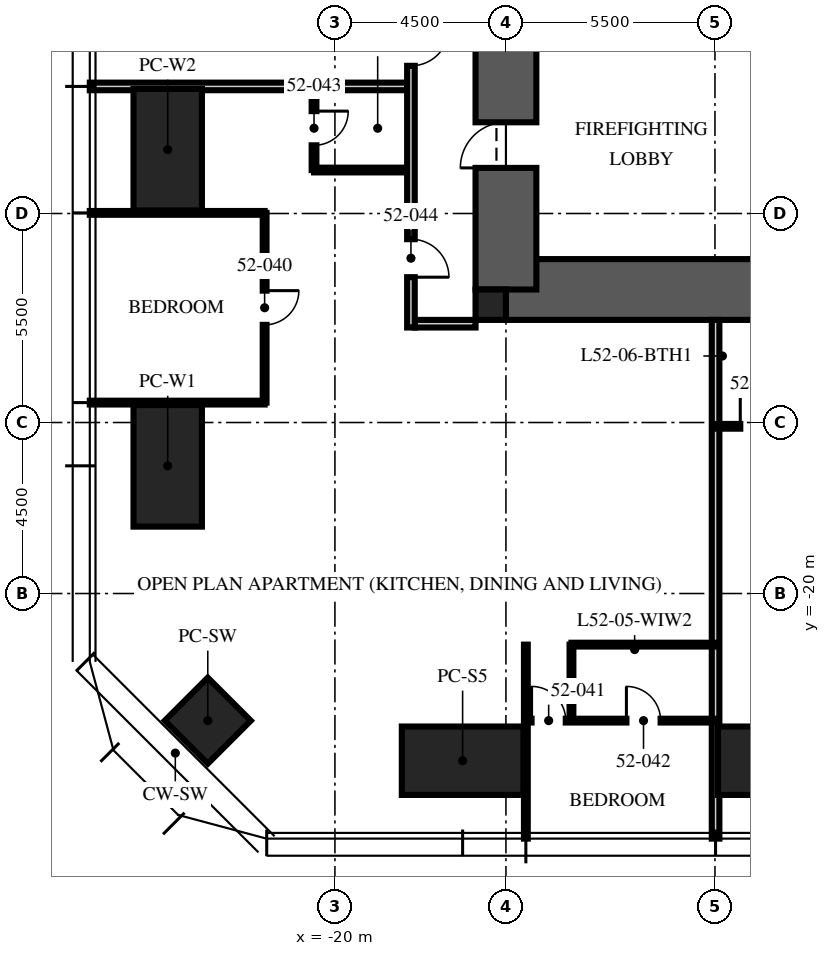
"""IFC4 building model, lengths in metres.
Left out: names, types, materials, properties, quantities, classifications, styles, units other than length and angle.
Written with IfcOpenShell. Run it as: python <this file> out.ifc"""

import sys

from ifc_helpers import new_model, si_unit, direction, frame, frame_2d, origin, origin_2d, place, context, subcontext, project, spatial, rectangle, hollow_rectangle, extrude, element, fill, save


model = new_model("IFC4")
c1 = context("Model", 3, precision=1e-05, world=origin(), true_north=direction((0.0, 1.0)))
c2 = subcontext(c1, "Body", "Model", "MODEL_VIEW")
j1 = project(units=[si_unit("LENGTHUNIT", "METRE"), si_unit("PLANEANGLEUNIT", "RADIAN")], contexts=[c1])
p1 = place(None, origin())
s1 = spatial("IfcSite", under=j1, at=p1, CompositionType="ELEMENT")
p2 = place(p1, origin())
s2 = spatial("IfcBuilding", under=s1, at=p2, CompositionType="ELEMENT")
p3 = place(p2, frame((0.0, 0.0, 210.75)))
s3 = spatial("IfcBuildingStorey", under=s2, at=p3, CompositionType="ELEMENT", Elevation=210.75)
p4 = place(p3, frame((-15.5, -12.0, -0.25), z_axis=(0.0, 0.0, 1.0), x_axis=(1.0, 0.0, 0.0)))
e1 = element("IfcWall", 1, at=p4, inside=s3, PredefinedType="SHEAR", context=c2, shape_type="SweptSolid", body=[
    extrude(rectangle(XDim=31.0, YDim=1.6, at=frame_2d((15.5, 0.0))), origin(), (0.0, 0.0, 1.0), 3.75),
])
p5 = place(p3, frame((-15.5, -12.0, -0.25), z_axis=(0.0, 0.0, 1.0), x_axis=(0.0, 1.0, 0.0)))
e2 = element("IfcWall", 2, at=p5, inside=s3, PredefinedType="SHEAR", context=c2, shape_type="SweptSolid", body=[
    extrude(rectangle(XDim=24.0, YDim=1.6, at=frame_2d((12.0, 0.0))), origin(), (0.0, 0.0, 1.0), 3.75),
])
p6 = place(p5, frame((3.2, 0.0, 0.25)))
e3 = element("IfcOpeningElement", 3, at=p6, cuts=e2, PredefinedType="OPENING", context=c2, shape_type="SweptSolid", body=[
    extrude(rectangle(XDim=1.2, YDim=2.1, at=frame_2d((0.6, 1.05))), frame((0.0, 0.81, 0.0), z_axis=(0.0, -1.0, 0.0), x_axis=(1.0, 0.0, 0.0)), (0.0, 0.0, 1.0), 1.62),
])
p7 = place(p5, frame((19.3, 0.0, 0.25)))
e4 = element("IfcOpeningElement", 4, at=p7, cuts=e2, PredefinedType="OPENING", context=c2, shape_type="SweptSolid", body=[
    extrude(rectangle(XDim=1.8, YDim=2.1, at=frame_2d((0.9, 1.05))), frame((0.0, 0.81, 0.0), z_axis=(0.0, -1.0, 0.0), x_axis=(1.0, 0.0, 0.0)), (0.0, 0.0, 1.0), 1.62),
])
p8 = place(p3, frame((-15.9, -12.4, -0.25), z_axis=(0.0, 0.0, 1.0), x_axis=(1.0, 0.0, 0.0)))
e5 = element("IfcColumn", 5, at=p8, inside=s3, PredefinedType="COLUMN", context=c2, shape_type="SweptSolid", body=[
    extrude(rectangle(XDim=0.8, YDim=0.8, at=origin_2d()), origin(), (0.0, 0.0, 1.0), 3.75),
])
for number, where, z_axis, x_axis in (
    (6, (-8.32, -24.4, 0.0), (0.0, 0.0, 1.0), (1.0, 0.0, 0.0)),
    (7, (-16.64, -24.4, 0.0), (0.0, 0.0, 1.0), (1.0, 0.0, 0.0)),
    (8, (-24.4, -16.64, 0.0), (0.0, 0.0, 1.0), (0.0, 1.0, 0.0)),
    (9, (-24.4, -8.32, 0.0), (0.0, 0.0, 1.0), (0.0, 1.0, 0.0)),
):
    element("IfcColumn", number, at=place(p3, frame(where, z_axis=z_axis, x_axis=x_axis)), inside=s3, PredefinedType="COLUMN", context=c2, shape_type="SweptSolid", body=[
        extrude(hollow_rectangle(XDim=3.2, YDim=1.8, WallThickness=0.2, at=origin_2d()), origin(), (0.0, 0.0, 1.0), 3.75),
    ])
p9 = place(p3, frame((-23.346, -23.346, 0.0), z_axis=(0.0, 0.0, 1.0), x_axis=(0.707106781187, -0.707106781187, 0.0)))
e10 = element("IfcColumn", 10, at=p9, inside=s3, PredefinedType="COLUMN", context=c2, shape_type="SweptSolid", body=[
    extrude(hollow_rectangle(XDim=1.6, YDim=1.6, WallThickness=0.1, at=origin_2d()), origin(), (0.0, 0.0, 1.0), 3.75),
])
p10 = place(p3, frame((-16.3, -12.9, 0.0), z_axis=(0.0, 0.0, 1.0), x_axis=(-1.0, 0.0, 0.0)))
e11 = element("IfcWall", 11, at=p10, inside=s3, PredefinedType="PARTITIONING", context=c2, shape_type="SweptSolid", body=[
    extrude(rectangle(XDim=1.6, YDim=0.2, at=frame_2d((0.8, 0.0))), origin(), (0.0, 0.0, 1.0), 2.3),
])
p11 = place(p3, frame((-18.1, -6.656, 0.0), z_axis=(0.0, 0.0, 1.0), x_axis=(-1.0, 0.0, 0.0)))
e12 = element("IfcWall", 12, at=p11, inside=s3, PredefinedType="PARTITIONING", context=c2, shape_type="SweptSolid", body=[
    extrude(rectangle(XDim=8.35, YDim=0.2, at=frame_2d((4.175, 0.0))), origin(), (0.0, 0.0, 1.0), 2.91),
])
for number, where, z_axis, x_axis in (
    (13, (-21.85, -9.984, 0.0), (0.0, 0.0, 1.0), (-1.0, 0.0, 0.0)),
    (14, (-21.85, -14.976, 0.0), (0.0, 0.0, 1.0), (-1.0, 0.0, 0.0)),
):
    element("IfcWall", number, at=place(p3, frame(where, z_axis=z_axis, x_axis=x_axis)), inside=s3, PredefinedType="PARTITIONING", context=c2, shape_type="SweptSolid", body=[
        extrude(rectangle(XDim=4.6, YDim=0.1, at=frame_2d((2.3, 0.0))), origin(), (0.0, 0.0, 1.0), 2.91),
    ])
p12 = place(p3, frame((-14.976, -21.345, 0.0), z_axis=(0.0, 0.0, 1.0), x_axis=(0.0, -1.0, 0.0)))
e15 = element("IfcWall", 15, at=p12, inside=s3, PredefinedType="PARTITIONING", context=c2, shape_type="SweptSolid", body=[
    extrude(rectangle(XDim=5.105, YDim=0.1, at=frame_2d((2.552, 0.0))), origin(), (0.0, 0.0, 1.0), 2.91),
])
p13 = place(p3, frame((-9.984, -12.8, 0.0), z_axis=(0.0, 0.0, 1.0), x_axis=(0.0, -1.0, 0.0)))
e16 = element("IfcWall", 16, at=p13, inside=s3, PredefinedType="PARTITIONING", context=c2, shape_type="SweptSolid", body=[
    extrude(rectangle(XDim=13.65, YDim=0.2, at=frame_2d((6.825, 0.0))), origin(), (0.0, 0.0, 1.0), 2.91),
])
p14 = place(p3, frame((-21.85, -9.984, 0.0), z_axis=(0.0, 0.0, 1.0), x_axis=(0.0, -1.0, 0.0)))
e17 = element("IfcWall", 17, at=p14, inside=s3, PredefinedType="PARTITIONING", context=c2, shape_type="SweptSolid", body=[
    extrude(rectangle(XDim=4.992, YDim=0.1, at=frame_2d((2.496, 0.0))), origin(), (0.0, 0.0, 1.0), 2.81),
])
p15 = place(p14, frame((2.046, 0.0, 0.0)))
e18 = element("IfcOpeningElement", 18, at=p15, cuts=e17, PredefinedType="OPENING", context=c2, shape_type="SweptSolid", body=[
    extrude(rectangle(XDim=0.9, YDim=2.1, at=frame_2d((0.45, 1.05))), frame((0.0, 0.06, 0.0), z_axis=(0.0, -1.0, 0.0), x_axis=(1.0, 0.0, 0.0)), (0.0, 0.0, 1.0), 0.12),
])
p16 = place(p3, frame((-14.976, -23.345, 0.0), z_axis=(0.0, 0.0, 1.0), x_axis=(1.0, 0.0, 0.0)))
e19 = element("IfcWall", 19, at=p16, inside=s3, PredefinedType="PARTITIONING", context=c2, shape_type="SweptSolid", body=[
    extrude(rectangle(XDim=4.992, YDim=0.1, at=frame_2d((2.496, 0.0))), origin(), (0.0, 0.0, 1.0), 2.81),
])
p17 = place(p16, frame((0.15, 0.0, 0.0)))
e20 = element("IfcOpeningElement", 20, at=p17, cuts=e19, PredefinedType="OPENING", context=c2, shape_type="SweptSolid", body=[
    extrude(rectangle(XDim=0.9, YDim=2.1, at=frame_2d((0.45, 1.05))), frame((0.0, 0.06, 0.0), z_axis=(0.0, -1.0, 0.0), x_axis=(1.0, 0.0, 0.0)), (0.0, 0.0, 1.0), 0.12),
])
p18 = place(p16, frame((2.646, 0.0, 0.0)))
e21 = element("IfcOpeningElement", 21, at=p18, cuts=e19, PredefinedType="OPENING", context=c2, shape_type="SweptSolid", body=[
    extrude(rectangle(XDim=0.9, YDim=2.1, at=frame_2d((0.45, 1.05))), frame((0.0, 0.06, 0.0), z_axis=(0.0, -1.0, 0.0), x_axis=(1.0, 0.0, 0.0)), (0.0, 0.0, 1.0), 0.12),
])
p19 = place(p3, frame((-13.776, -21.345, 0.0), z_axis=(0.0, 0.0, 1.0), x_axis=(0.0, -1.0, 0.0)))
e22 = element("IfcWall", 22, at=p19, inside=s3, PredefinedType="PARTITIONING", context=c2, shape_type="SweptSolid", body=[
    extrude(rectangle(XDim=2.0, YDim=0.1, at=frame_2d((1.0, 0.0))), origin(), (0.0, 0.0, 1.0), 3.5),
])
p20 = place(p3, frame((-13.776, -21.345, 0.0), z_axis=(0.0, 0.0, 1.0), x_axis=(1.0, 0.0, 0.0)))
e23 = element("IfcWall", 23, at=p20, inside=s3, PredefinedType="PARTITIONING", context=c2, shape_type="SweptSolid", body=[
    extrude(rectangle(XDim=3.792, YDim=0.1, at=frame_2d((1.896, 0.0))), origin(), (0.0, 0.0, 1.0), 2.81),
])
p21 = place(p3, frame((-20.55, -6.656, 0.0), z_axis=(0.0, 0.0, 1.0), x_axis=(0.0, -1.0, 0.0)))
e24 = element("IfcWall", 24, at=p21, inside=s3, PredefinedType="PARTITIONING", context=c2, shape_type="SweptSolid", body=[
    extrude(rectangle(XDim=2.2, YDim=0.125, at=frame_2d((1.1, 0.0))), origin(), (0.0, 0.0, 1.0), 2.6),
])
p22 = place(p21, frame((0.65, 0.0, 0.0)))
e25 = element("IfcOpeningElement", 25, at=p22, cuts=e24, PredefinedType="OPENING", context=c2, shape_type="SweptSolid", body=[
    extrude(rectangle(XDim=0.9, YDim=2.1, at=frame_2d((0.45, 1.05))), frame((0.0, 0.073, 0.0), z_axis=(0.0, -1.0, 0.0), x_axis=(1.0, 0.0, 0.0)), (0.0, 0.0, 1.0), 0.145),
])
p23 = place(p3, frame((-18.1, -8.856, 0.0), z_axis=(0.0, 0.0, 1.0), x_axis=(-1.0, 0.0, 0.0)))
e26 = element("IfcWall", 26, at=p23, inside=s3, PredefinedType="PARTITIONING", context=c2, shape_type="SweptSolid", body=[
    extrude(rectangle(XDim=2.45, YDim=0.125, at=frame_2d((1.225, 0.0))), origin(), (0.0, 0.0, 1.0), 3.5),
])
p24 = place(p3, frame((-9.984, -15.6, 0.0), z_axis=(0.0, 0.0, 1.0), x_axis=(1.0, 0.0, 0.0)))
e27 = element("IfcWall", 27, at=p24, inside=s3, PredefinedType="PARTITIONING", context=c2, shape_type="SweptSolid", body=[
    extrude(rectangle(XDim=4.0, YDim=0.125, at=frame_2d((2.0, 0.0))), origin(), (0.0, 0.0, 1.0), 2.6),
])
p25 = place(p24, frame((0.65, 0.0, 0.0)))
e28 = element("IfcOpeningElement", 28, at=p25, cuts=e27, PredefinedType="OPENING", context=c2, shape_type="SweptSolid", body=[
    extrude(rectangle(XDim=0.9, YDim=2.1, at=frame_2d((0.45, 1.05))), frame((0.0, 0.073, 0.0), z_axis=(0.0, -1.0, 0.0), x_axis=(1.0, 0.0, 0.0)), (0.0, 0.0, 1.0), 0.145),
])
p26 = place(p24, frame((2.65, 0.0, 0.0)))
e29 = element("IfcOpeningElement", 29, at=p26, cuts=e27, PredefinedType="OPENING", context=c2, shape_type="SweptSolid", body=[
    extrude(rectangle(XDim=0.9, YDim=2.1, at=frame_2d((0.45, 1.05))), frame((0.0, 0.073, 0.0), z_axis=(0.0, -1.0, 0.0), x_axis=(1.0, 0.0, 0.0)), (0.0, 0.0, 1.0), 0.145),
])
p27 = place(p3, frame((-18.0, 13.0, 0.0), z_axis=(0.0, 0.0, 1.0), x_axis=(0.0, -1.0, 0.0)))
e30 = element("IfcWall", 30, at=p27, inside=s3, PredefinedType="PARTITIONING", context=c2, shape_type="SweptSolid", body=[
    extrude(rectangle(XDim=26.0, YDim=0.2, at=frame_2d((13.0, 0.0))), origin(), (0.0, 0.0, 1.0), 2.6),
])
p28 = place(p27, frame((4.6, 0.0, 0.0)))
e31 = element("IfcOpeningElement", 31, at=p28, cuts=e30, PredefinedType="OPENING", context=c2, shape_type="SweptSolid", body=[
    extrude(rectangle(XDim=1.0, YDim=2.2, at=frame_2d((0.5, 1.1))), frame((0.0, 0.11, 0.0), z_axis=(0.0, -1.0, 0.0), x_axis=(1.0, 0.0, 0.0)), (0.0, 0.0, 1.0), 0.22),
])
p29 = place(p27, frame((18.114, 0.0, 0.0)))
e32 = element("IfcOpeningElement", 32, at=p29, cuts=e30, PredefinedType="OPENING", context=c2, shape_type="SweptSolid", body=[
    extrude(rectangle(XDim=1.0, YDim=2.2, at=frame_2d((0.5, 1.1))), frame((0.0, 0.11, 0.0), z_axis=(0.0, -1.0, 0.0), x_axis=(1.0, 0.0, 0.0)), (0.0, 0.0, 1.0), 0.22),
])
p30 = place(p27, frame((23.676, 0.0, 0.0)))
e33 = element("IfcOpeningElement", 33, at=p30, cuts=e30, PredefinedType="OPENING", context=c2, shape_type="SweptSolid", body=[
    extrude(rectangle(XDim=1.0, YDim=2.2, at=frame_2d((0.5, 1.1))), frame((0.0, 0.11, 0.0), z_axis=(0.0, -1.0, 0.0), x_axis=(1.0, 0.0, 0.0)), (0.0, 0.0, 1.0), 0.22),
])
p31 = place(p6, origin())
e34 = element("IfcDoor", 34, at=p31, inside=s3, OperationType="SINGLE_SWING_LEFT", PredefinedType="DOOR", context=c2, shape_type="SweptSolid", body=[
    extrude(rectangle(XDim=1.2, YDim=2.1, at=frame_2d((0.6, 1.05))), frame((0.0, 0.025, 0.0), z_axis=(0.0, -1.0, 0.0), x_axis=(1.0, 0.0, 0.0)), (0.0, 0.0, 1.0), 0.05),
])
fill(e3, e34)
p32 = place(p29, origin())
e35 = element("IfcDoor", 35, at=p32, inside=s3, OperationType="SINGLE_SWING_LEFT", PredefinedType="DOOR", context=c2, shape_type="SweptSolid", body=[
    extrude(rectangle(XDim=1.0, YDim=2.2, at=frame_2d((0.5, 1.1))), frame((0.0, 0.025, 0.0), z_axis=(0.0, -1.0, 0.0), x_axis=(1.0, 0.0, 0.0)), (0.0, 0.0, 1.0), 0.05),
])
fill(e32, e35)
p33 = place(p15, origin())
e36 = element("IfcDoor", 36, at=p33, inside=s3, OperationType="SINGLE_SWING_LEFT", PredefinedType="DOOR", context=c2, shape_type="SweptSolid", body=[
    extrude(rectangle(XDim=0.9, YDim=2.1, at=frame_2d((0.45, 1.05))), frame((0.0, 0.025, 0.0), z_axis=(0.0, -1.0, 0.0), x_axis=(1.0, 0.0, 0.0)), (0.0, 0.0, 1.0), 0.05),
])
fill(e18, e36)
p34 = place(p17, origin())
e37 = element("IfcDoor", 37, at=p34, inside=s3, OperationType="SINGLE_SWING_LEFT", PredefinedType="DOOR", context=c2, shape_type="SweptSolid", body=[
    extrude(rectangle(XDim=0.9, YDim=2.1, at=frame_2d((0.45, 1.05))), frame((0.0, 0.025, 0.0), z_axis=(0.0, -1.0, 0.0), x_axis=(1.0, 0.0, 0.0)), (0.0, 0.0, 1.0), 0.05),
])
fill(e20, e37)
p35 = place(p18, origin())
e38 = element("IfcDoor", 38, at=p35, inside=s3, OperationType="SINGLE_SWING_LEFT", PredefinedType="DOOR", context=c2, shape_type="SweptSolid", body=[
    extrude(rectangle(XDim=0.9, YDim=2.1, at=frame_2d((0.45, 1.05))), frame((0.0, 0.025, 0.0), z_axis=(0.0, -1.0, 0.0), x_axis=(1.0, 0.0, 0.0)), (0.0, 0.0, 1.0), 0.05),
])
fill(e21, e38)
p36 = place(p22, origin())
e39 = element("IfcDoor", 39, at=p36, inside=s3, OperationType="SINGLE_SWING_LEFT", PredefinedType="DOOR", context=c2, shape_type="SweptSolid", body=[
    extrude(rectangle(XDim=0.9, YDim=2.1, at=frame_2d((0.45, 1.05))), frame((0.0, 0.025, 0.0), z_axis=(0.0, -1.0, 0.0), x_axis=(1.0, 0.0, 0.0)), (0.0, 0.0, 1.0), 0.05),
])
fill(e25, e39)
p37 = place(p30, origin())
e40 = element("IfcDoor", 40, at=p37, inside=s3, OperationType="SINGLE_SWING_RIGHT", PredefinedType="DOOR", context=c2, shape_type="SweptSolid", body=[
    extrude(rectangle(XDim=1.0, YDim=2.2, at=frame_2d((0.5, 1.1))), frame((0.0, 0.025, 0.0), z_axis=(0.0, -1.0, 0.0), x_axis=(1.0, 0.0, 0.0)), (0.0, 0.0, 1.0), 0.05),
])
fill(e33, e40)
p38 = place(p25, origin())
e41 = element("IfcDoor", 41, at=p38, inside=s3, OperationType="SINGLE_SWING_LEFT", PredefinedType="DOOR", context=c2, shape_type="SweptSolid", body=[
    extrude(rectangle(XDim=0.9, YDim=2.1, at=frame_2d((0.45, 1.05))), frame((0.0, 0.025, 0.0), z_axis=(0.0, -1.0, 0.0), x_axis=(1.0, 0.0, 0.0)), (0.0, 0.0, 1.0), 0.05),
])
fill(e28, e41)
save(model, sys.argv[1])
